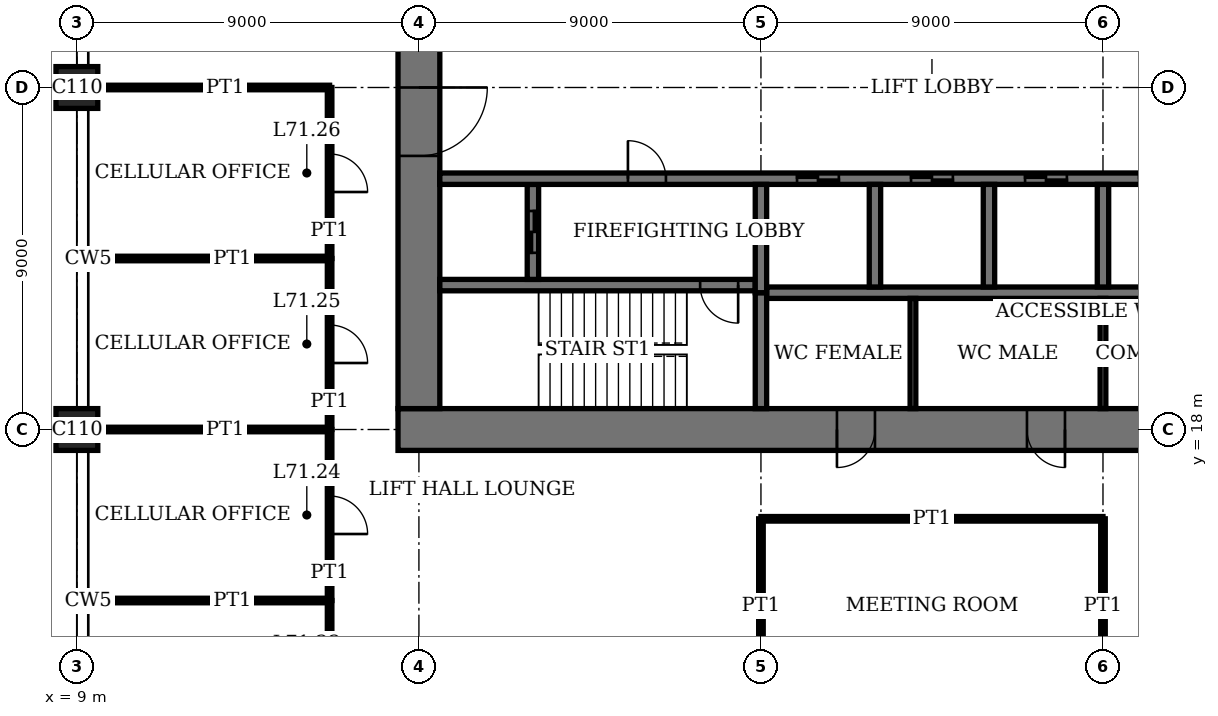
"""IFC4 building model, lengths in metres.
Left out: names, types, materials, properties, quantities, classifications, styles, units other than length and angle.
Written with IfcOpenShell. Run it as: python <this file> out.ifc"""

import sys

from ifc_helpers import new_model, si_unit, direction, frame, frame_2d, origin, origin_2d, place, context, subcontext, project, spatial, rectangle, extrude, element, fill, save


model = new_model("IFC4")
c1 = context("Model", 3, precision=1e-05, world=origin(), true_north=direction((0.0, 1.0)))
c2 = subcontext(c1, "Body", "Model", "MODEL_VIEW")
j1 = project(units=[si_unit("LENGTHUNIT", "METRE"), si_unit("PLANEANGLEUNIT", "RADIAN")], contexts=[c1])
p1 = place(None, origin())
s1 = spatial("IfcSite", under=j1, at=p1, CompositionType="ELEMENT")
p2 = place(p1, origin())
s2 = spatial("IfcBuilding", under=s1, at=p2, CompositionType="ELEMENT")
p3 = place(p2, frame((0.0, 0.0, 291.4)))
s3 = spatial("IfcBuildingStorey", under=s2, at=p3, CompositionType="ELEMENT", Elevation=291.4)
for number, where, z_axis, x_axis in (
    (1, (9.0, 18.0, 0.0), (0.0, 0.0, 1.0), (1.0, 0.0, 0.0)),
    (2, (9.0, 27.0, 0.0), (0.0, 0.0, 1.0), (1.0, 0.0, 0.0)),
):
    element("IfcColumn", number, at=place(p3, frame(where, z_axis=z_axis, x_axis=x_axis)), inside=s3, PredefinedType="COLUMN", context=c2, shape_type="SweptSolid", body=[
        extrude(rectangle(XDim=1.1, YDim=1.1, at=origin_2d()), origin(), (0.0, 0.0, 1.0), 4.0),
    ])
p4 = place(p3, frame((17.45, 18.0, 0.0), z_axis=(0.0, 0.0, 1.0), x_axis=(1.0, 0.0, 0.0)))
e3 = element("IfcWall", 3, at=p4, inside=s3, PredefinedType="SHEAR", context=c2, shape_type="SweptSolid", body=[
    extrude(rectangle(XDim=28.1, YDim=1.1, at=frame_2d((14.05, 0.0))), origin(), (0.0, 0.0, 1.0), 4.0),
])
p5 = place(p4, frame((11.55, 0.0, 0.0)))
e4 = element("IfcOpeningElement", 4, at=p5, cuts=e3, PredefinedType="OPENING", context=c2, shape_type="SweptSolid", body=[
    extrude(rectangle(XDim=1.0, YDim=2.4, at=frame_2d((0.5, 1.2))), frame((0.0, 0.56, 0.0), z_axis=(0.0, -1.0, 0.0), x_axis=(1.0, 0.0, 0.0)), (0.0, 0.0, 1.0), 1.12),
])
p6 = place(p4, frame((16.55, 0.0, 0.0)))
e5 = element("IfcOpeningElement", 5, at=p6, cuts=e3, PredefinedType="OPENING", context=c2, shape_type="SweptSolid", body=[
    extrude(rectangle(XDim=1.0, YDim=2.4, at=frame_2d((0.5, 1.2))), frame((0.0, 0.56, 0.0), z_axis=(0.0, -1.0, 0.0), x_axis=(1.0, 0.0, 0.0)), (0.0, 0.0, 1.0), 1.12),
])
p7 = place(p4, frame((20.0, 0.0, 0.0)))
e6 = element("IfcOpeningElement", 6, at=p7, cuts=e3, PredefinedType="OPENING", context=c2, shape_type="SweptSolid", body=[
    extrude(rectangle(XDim=1.1, YDim=2.4, at=frame_2d((0.55, 1.2))), frame((0.0, 0.56, 0.0), z_axis=(0.0, -1.0, 0.0), x_axis=(1.0, 0.0, 0.0)), (0.0, 0.0, 1.0), 1.12),
])
p8 = place(p4, frame((24.05, 0.0, 0.0)))
e7 = element("IfcOpeningElement", 7, at=p8, cuts=e3, PredefinedType="OPENING", context=c2, shape_type="SweptSolid", body=[
    extrude(rectangle(XDim=1.0, YDim=2.4, at=frame_2d((0.5, 1.2))), frame((0.0, 0.56, 0.0), z_axis=(0.0, -1.0, 0.0), x_axis=(1.0, 0.0, 0.0)), (0.0, 0.0, 1.0), 1.12),
])
p9 = place(p3, frame((18.0, 35.45, 0.0), z_axis=(0.0, 0.0, 1.0), x_axis=(0.0, -1.0, 0.0)))
e8 = element("IfcWall", 8, at=p9, inside=s3, PredefinedType="SHEAR", context=c2, shape_type="SweptSolid", body=[
    extrude(rectangle(XDim=16.9, YDim=1.1, at=frame_2d((8.45, 0.0))), origin(), (0.0, 0.0, 1.0), 4.0),
])
p10 = place(p9, frame((8.45, 0.0, 0.0)))
e9 = element("IfcOpeningElement", 9, at=p10, cuts=e8, PredefinedType="OPENING", context=c2, shape_type="SweptSolid", body=[
    extrude(rectangle(XDim=1.8, YDim=2.4, at=frame_2d((0.9, 1.2))), frame((0.0, 0.56, 0.0), z_axis=(0.0, -1.0, 0.0), x_axis=(1.0, 0.0, 0.0)), (0.0, 0.0, 1.0), 1.12),
])
p11 = place(p3, frame((18.55, 21.8, 0.0), z_axis=(0.0, 0.0, 1.0), x_axis=(1.0, 0.0, 0.0)))
e10 = element("IfcWall", 10, at=p11, inside=s3, PredefinedType="SHEAR", context=c2, shape_type="SweptSolid", body=[
    extrude(rectangle(XDim=8.3, YDim=0.3, at=frame_2d((4.15, 0.0))), origin(), (0.0, 0.0, 1.0), 4.0),
])
p12 = place(p11, frame((6.85, 0.0, 0.0)))
e11 = element("IfcOpeningElement", 11, at=p12, cuts=e10, PredefinedType="OPENING", context=c2, shape_type="SweptSolid", body=[
    extrude(rectangle(XDim=1.0, YDim=2.4, at=frame_2d((0.5, 1.2))), frame((0.0, 0.16, 0.0), z_axis=(0.0, -1.0, 0.0), x_axis=(1.0, 0.0, 0.0)), (0.0, 0.0, 1.0), 0.32),
])
p13 = place(p3, frame((27.0, 18.55, 0.0), z_axis=(0.0, 0.0, 1.0), x_axis=(0.0, 1.0, 0.0)))
e12 = element("IfcWall", 12, at=p13, inside=s3, PredefinedType="SHEAR", context=c2, shape_type="SweptSolid", body=[
    extrude(rectangle(XDim=3.05, YDim=0.3, at=frame_2d((1.525, 0.0))), origin(), (0.0, 0.0, 1.0), 4.0),
])
p14 = place(p3, frame((21.0, 21.95, 0.0), z_axis=(0.0, 0.0, 1.0), x_axis=(0.0, 1.0, 0.0)))
e13 = element("IfcWall", 13, at=p14, inside=s3, PredefinedType="SHEAR", context=c2, shape_type="SweptSolid", body=[
    extrude(rectangle(XDim=2.5, YDim=0.3, at=frame_2d((1.25, 0.0))), origin(), (0.0, 0.0, 1.0), 4.0),
])
p15 = place(p14, frame((0.7, 0.0, 0.0)))
e14 = element("IfcOpeningElement", 14, at=p15, cuts=e13, PredefinedType="OPENING", context=c2, shape_type="SweptSolid", body=[
    extrude(rectangle(XDim=1.1, YDim=2.4, at=frame_2d((0.55, 1.2))), frame((0.0, 0.16, 0.0), z_axis=(0.0, -1.0, 0.0), x_axis=(1.0, 0.0, 0.0)), (0.0, 0.0, 1.0), 0.32),
])
p16 = place(p3, frame((18.55, 24.6, 0.0), z_axis=(0.0, 0.0, 1.0), x_axis=(1.0, 0.0, 0.0)))
e15 = element("IfcWall", 15, at=p16, inside=s3, PredefinedType="SHEAR", context=c2, shape_type="SweptSolid", body=[
    extrude(rectangle(XDim=25.9, YDim=0.3, at=frame_2d((12.95, 0.0))), origin(), (0.0, 0.0, 1.0), 4.0),
])
p17 = place(p16, frame((4.95, 0.0, 0.0)))
e16 = element("IfcOpeningElement", 16, at=p17, cuts=e15, PredefinedType="OPENING", context=c2, shape_type="SweptSolid", body=[
    extrude(rectangle(XDim=1.0, YDim=2.4, at=frame_2d((0.5, 1.2))), frame((0.0, 0.16, 0.0), z_axis=(0.0, -1.0, 0.0), x_axis=(1.0, 0.0, 0.0)), (0.0, 0.0, 1.0), 0.32),
])
p18 = place(p16, frame((24.5, 0.0, 0.0)))
e17 = element("IfcOpeningElement", 17, at=p18, cuts=e15, PredefinedType="OPENING", context=c2, shape_type="SweptSolid", body=[
    extrude(rectangle(XDim=0.9, YDim=2.1, at=frame_2d((0.45, 1.05))), frame((0.0, 0.16, 0.0), z_axis=(0.0, -1.0, 0.0), x_axis=(1.0, 0.0, 0.0)), (0.0, 0.0, 1.0), 0.32),
])
p19 = place(p16, frame((9.4, 0.0, 0.0)))
e18 = element("IfcOpeningElement", 18, at=p19, cuts=e15, PredefinedType="OPENING", context=c2, shape_type="SweptSolid", body=[
    extrude(rectangle(XDim=1.1, YDim=2.4, at=frame_2d((0.55, 1.2))), frame((0.0, 0.16, 0.0), z_axis=(0.0, -1.0, 0.0), x_axis=(1.0, 0.0, 0.0)), (0.0, 0.0, 1.0), 0.32),
])
p20 = place(p16, frame((12.4, 0.0, 0.0)))
e19 = element("IfcOpeningElement", 19, at=p20, cuts=e15, PredefinedType="OPENING", context=c2, shape_type="SweptSolid", body=[
    extrude(rectangle(XDim=1.1, YDim=2.4, at=frame_2d((0.55, 1.2))), frame((0.0, 0.16, 0.0), z_axis=(0.0, -1.0, 0.0), x_axis=(1.0, 0.0, 0.0)), (0.0, 0.0, 1.0), 0.32),
])
p21 = place(p16, frame((15.4, 0.0, 0.0)))
e20 = element("IfcOpeningElement", 20, at=p21, cuts=e15, PredefinedType="OPENING", context=c2, shape_type="SweptSolid", body=[
    extrude(rectangle(XDim=1.1, YDim=2.4, at=frame_2d((0.55, 1.2))), frame((0.0, 0.16, 0.0), z_axis=(0.0, -1.0, 0.0), x_axis=(1.0, 0.0, 0.0)), (0.0, 0.0, 1.0), 0.32),
])
p22 = place(p16, frame((18.4, 0.0, 0.0)))
e21 = element("IfcOpeningElement", 21, at=p22, cuts=e15, PredefinedType="OPENING", context=c2, shape_type="SweptSolid", body=[
    extrude(rectangle(XDim=1.1, YDim=2.4, at=frame_2d((0.55, 1.2))), frame((0.0, 0.16, 0.0), z_axis=(0.0, -1.0, 0.0), x_axis=(1.0, 0.0, 0.0)), (0.0, 0.0, 1.0), 0.32),
])
p23 = place(p16, frame((21.3, 0.0, 0.0)))
e22 = element("IfcOpeningElement", 22, at=p23, cuts=e15, PredefinedType="OPENING", context=c2, shape_type="SweptSolid", body=[
    extrude(rectangle(XDim=1.3, YDim=2.4, at=frame_2d((0.65, 1.2))), frame((0.0, 0.16, 0.0), z_axis=(0.0, -1.0, 0.0), x_axis=(1.0, 0.0, 0.0)), (0.0, 0.0, 1.0), 0.32),
])
p24 = place(p3, frame((27.15, 21.6, 0.0), z_axis=(0.0, 0.0, 1.0), x_axis=(1.0, 0.0, 0.0)))
e23 = element("IfcWall", 23, at=p24, inside=s3, PredefinedType="SHEAR", context=c2, shape_type="SweptSolid", body=[
    extrude(rectangle(XDim=17.3, YDim=0.3, at=frame_2d((8.65, 0.0))), origin(), (0.0, 0.0, 1.0), 4.0),
])
for number, where, z_axis, x_axis in (
    (24, (30.0, 21.75, 0.0), (0.0, 0.0, 1.0), (0.0, 1.0, 0.0)),
    (25, (33.0, 21.75, 0.0), (0.0, 0.0, 1.0), (0.0, 1.0, 0.0)),
    (26, (36.0, 21.75, 0.0), (0.0, 0.0, 1.0), (0.0, 1.0, 0.0)),
):
    element("IfcWall", number, at=place(p3, frame(where, z_axis=z_axis, x_axis=x_axis)), inside=s3, PredefinedType="SHEAR", context=c2, shape_type="SweptSolid", body=[
        extrude(rectangle(XDim=2.7, YDim=0.3, at=frame_2d((1.35, 0.0))), origin(), (0.0, 0.0, 1.0), 4.0),
    ])
p25 = place(p3, frame((27.0, 21.6, 0.0), z_axis=(0.0, 0.0, 1.0), x_axis=(0.0, 1.0, 0.0)))
e27 = element("IfcWall", 27, at=p25, inside=s3, PredefinedType="SHEAR", context=c2, shape_type="SweptSolid", body=[
    extrude(rectangle(XDim=2.85, YDim=0.3, at=frame_2d((1.425, 0.0))), origin(), (0.0, 0.0, 1.0), 4.0),
])
p26 = place(p3, frame((9.31, 13.5, 0.0), z_axis=(0.0, 0.0, 1.0), x_axis=(1.0, 0.0, 0.0)))
e28 = element("IfcWall", 28, at=p26, inside=s3, PredefinedType="PARTITIONING", context=c2, shape_type="SweptSolid", body=[
    extrude(rectangle(XDim=6.34, YDim=0.12, at=frame_2d((3.17, 0.0))), origin(), (0.0, 0.0, 1.0), 3.1),
])
p27 = place(p3, frame((27.0, 15.65, 0.0), z_axis=(0.0, 0.0, 1.0), x_axis=(1.0, 0.0, 0.0)))
e29 = element("IfcWall", 29, at=p27, inside=s3, PredefinedType="PARTITIONING", context=c2, shape_type="SweptSolid", body=[
    extrude(rectangle(XDim=9.0, YDim=0.12, at=frame_2d((4.5, 0.0))), origin(), (0.0, 0.0, 1.0), 3.75),
])
p28 = place(p3, frame((9.55, 18.0, 0.0), z_axis=(0.0, 0.0, 1.0), x_axis=(1.0, 0.0, 0.0)))
e30 = element("IfcWall", 30, at=p28, inside=s3, PredefinedType="PARTITIONING", context=c2, shape_type="SweptSolid", body=[
    extrude(rectangle(XDim=6.1, YDim=0.12, at=frame_2d((3.05, 0.0))), origin(), (0.0, 0.0, 1.0), 3.05),
])
p29 = place(p3, frame((9.31, 22.5, 0.0), z_axis=(0.0, 0.0, 1.0), x_axis=(1.0, 0.0, 0.0)))
e31 = element("IfcWall", 31, at=p29, inside=s3, PredefinedType="PARTITIONING", context=c2, shape_type="SweptSolid", body=[
    extrude(rectangle(XDim=6.34, YDim=0.12, at=frame_2d((3.17, 0.0))), origin(), (0.0, 0.0, 1.0), 3.1),
])
p30 = place(p3, frame((9.55, 27.0, 0.0), z_axis=(0.0, 0.0, 1.0), x_axis=(1.0, 0.0, 0.0)))
e32 = element("IfcWall", 32, at=p30, inside=s3, PredefinedType="PARTITIONING", context=c2, shape_type="SweptSolid", body=[
    extrude(rectangle(XDim=6.1, YDim=0.12, at=frame_2d((3.05, 0.0))), origin(), (0.0, 0.0, 1.0), 3.05),
])
p31 = place(p3, frame((15.65, 9.0, 0.0), z_axis=(0.0, 0.0, 1.0), x_axis=(0.0, 1.0, 0.0)))
e33 = element("IfcWall", 33, at=p31, inside=s3, PredefinedType="PARTITIONING", context=c2, shape_type="SweptSolid", body=[
    extrude(rectangle(XDim=4.5, YDim=0.12, at=frame_2d((2.25, 0.0))), origin(), (0.0, 0.0, 1.0), 3.75),
])
p32 = place(p31, frame((1.75, 0.0, 0.0)))
e34 = element("IfcOpeningElement", 34, at=p32, cuts=e33, PredefinedType="OPENING", context=c2, shape_type="SweptSolid", body=[
    extrude(rectangle(XDim=1.0, YDim=2.4, at=frame_2d((0.5, 1.2))), frame((0.0, 0.07, 0.0), z_axis=(0.0, -1.0, 0.0), x_axis=(1.0, 0.0, 0.0)), (0.0, 0.0, 1.0), 0.14),
])
p33 = place(p3, frame((15.65, 13.5, 0.0), z_axis=(0.0, 0.0, 1.0), x_axis=(0.0, 1.0, 0.0)))
e35 = element("IfcWall", 35, at=p33, inside=s3, PredefinedType="PARTITIONING", context=c2, shape_type="SweptSolid", body=[
    extrude(rectangle(XDim=4.5, YDim=0.12, at=frame_2d((2.25, 0.0))), origin(), (0.0, 0.0, 1.0), 3.75),
])
p34 = place(p33, frame((1.75, 0.0, 0.0)))
e36 = element("IfcOpeningElement", 36, at=p34, cuts=e35, PredefinedType="OPENING", context=c2, shape_type="SweptSolid", body=[
    extrude(rectangle(XDim=1.0, YDim=2.4, at=frame_2d((0.5, 1.2))), frame((0.0, 0.07, 0.0), z_axis=(0.0, -1.0, 0.0), x_axis=(1.0, 0.0, 0.0)), (0.0, 0.0, 1.0), 0.14),
])
p35 = place(p3, frame((15.65, 18.0, 0.0), z_axis=(0.0, 0.0, 1.0), x_axis=(0.0, 1.0, 0.0)))
e37 = element("IfcWall", 37, at=p35, inside=s3, PredefinedType="PARTITIONING", context=c2, shape_type="SweptSolid", body=[
    extrude(rectangle(XDim=4.5, YDim=0.12, at=frame_2d((2.25, 0.0))), origin(), (0.0, 0.0, 1.0), 3.75),
])
p36 = place(p35, frame((1.75, 0.0, 0.0)))
e38 = element("IfcOpeningElement", 38, at=p36, cuts=e37, PredefinedType="OPENING", context=c2, shape_type="SweptSolid", body=[
    extrude(rectangle(XDim=1.0, YDim=2.4, at=frame_2d((0.5, 1.2))), frame((0.0, 0.07, 0.0), z_axis=(0.0, -1.0, 0.0), x_axis=(1.0, 0.0, 0.0)), (0.0, 0.0, 1.0), 0.14),
])
p37 = place(p3, frame((15.65, 22.5, 0.0), z_axis=(0.0, 0.0, 1.0), x_axis=(0.0, 1.0, 0.0)))
e39 = element("IfcWall", 39, at=p37, inside=s3, PredefinedType="PARTITIONING", context=c2, shape_type="SweptSolid", body=[
    extrude(rectangle(XDim=4.5, YDim=0.12, at=frame_2d((2.25, 0.0))), origin(), (0.0, 0.0, 1.0), 3.75),
])
p38 = place(p37, frame((1.75, 0.0, 0.0)))
e40 = element("IfcOpeningElement", 40, at=p38, cuts=e39, PredefinedType="OPENING", context=c2, shape_type="SweptSolid", body=[
    extrude(rectangle(XDim=1.0, YDim=2.4, at=frame_2d((0.5, 1.2))), frame((0.0, 0.07, 0.0), z_axis=(0.0, -1.0, 0.0), x_axis=(1.0, 0.0, 0.0)), (0.0, 0.0, 1.0), 0.14),
])
for number, where, z_axis, x_axis in (
    (41, (27.0, 11.05, 0.0), (0.0, 0.0, 1.0), (0.0, 1.0, 0.0)),
    (42, (36.0, 11.05, 0.0), (0.0, 0.0, 1.0), (0.0, 1.0, 0.0)),
):
    element("IfcWall", number, at=place(p3, frame(where, z_axis=z_axis, x_axis=x_axis)), inside=s3, PredefinedType="PARTITIONING", context=c2, shape_type="SweptSolid", body=[
        extrude(rectangle(XDim=4.6, YDim=0.12, at=frame_2d((2.3, 0.0))), origin(), (0.0, 0.0, 1.0), 3.05),
    ])
for number, where, z_axis, x_axis in (
    (43, (31.0, 18.55, 0.0), (0.0, 0.0, 1.0), (0.0, 1.0, 0.0)),
    (44, (36.0, 18.55, 0.0), (0.0, 0.0, 1.0), (0.0, 1.0, 0.0)),
):
    element("IfcWall", number, at=place(p3, frame(where, z_axis=z_axis, x_axis=x_axis)), inside=s3, PredefinedType="PARTITIONING", context=c2, shape_type="SweptSolid", body=[
        extrude(rectangle(XDim=2.9, YDim=0.15, at=frame_2d((1.45, 0.0))), origin(), (0.0, 0.0, 1.0), 3.75),
    ])
p39 = place(p10, origin())
e45 = element("IfcDoor", 45, at=p39, inside=s3, OperationType="DOUBLE_DOOR_DOUBLE_SWING", PredefinedType="DOOR", context=c2, shape_type="SweptSolid", body=[
    extrude(rectangle(XDim=1.8, YDim=2.4, at=frame_2d((0.9, 1.2))), frame((0.0, 0.03, 0.0), z_axis=(0.0, -1.0, 0.0), x_axis=(1.0, 0.0, 0.0)), (0.0, 0.0, 1.0), 0.06),
    extrude(rectangle(XDim=0.04, YDim=2.4, at=frame_2d((0.02, 1.2))), frame((0.0, 0.55, 0.0), z_axis=(0.0, -1.0, 0.0), x_axis=(1.0, 0.0, 0.0)), (0.0, 0.0, 1.0), 1.1),
    extrude(rectangle(XDim=0.04, YDim=2.4, at=frame_2d((1.78, 1.2))), frame((0.0, 0.55, 0.0), z_axis=(0.0, -1.0, 0.0), x_axis=(1.0, 0.0, 0.0)), (0.0, 0.0, 1.0), 1.1),
    extrude(rectangle(XDim=1.8, YDim=0.04, at=frame_2d((0.9, 2.38))), frame((0.0, 0.55, 0.0), z_axis=(0.0, -1.0, 0.0), x_axis=(1.0, 0.0, 0.0)), (0.0, 0.0, 1.0), 1.1),
])
fill(e9, e45)
p40 = place(p5, origin())
e46 = element("IfcDoor", 46, at=p40, inside=s3, OperationType="SINGLE_SWING_LEFT", PredefinedType="DOOR", context=c2, shape_type="SweptSolid", body=[
    extrude(rectangle(XDim=1.0, YDim=2.4, at=frame_2d((0.5, 1.2))), frame((0.0, 0.025, 0.0), z_axis=(0.0, -1.0, 0.0), x_axis=(1.0, 0.0, 0.0)), (0.0, 0.0, 1.0), 0.05),
    extrude(rectangle(XDim=0.04, YDim=2.4, at=frame_2d((0.02, 1.2))), frame((0.0, 0.4, 0.0), z_axis=(0.0, -1.0, 0.0), x_axis=(1.0, 0.0, 0.0)), (0.0, 0.0, 1.0), 0.8),
    extrude(rectangle(XDim=0.04, YDim=2.4, at=frame_2d((0.98, 1.2))), frame((0.0, 0.4, 0.0), z_axis=(0.0, -1.0, 0.0), x_axis=(1.0, 0.0, 0.0)), (0.0, 0.0, 1.0), 0.8),
    extrude(rectangle(XDim=1.0, YDim=0.04, at=frame_2d((0.5, 2.38))), frame((0.0, 0.4, 0.0), z_axis=(0.0, -1.0, 0.0), x_axis=(1.0, 0.0, 0.0)), (0.0, 0.0, 1.0), 0.8),
])
fill(e4, e46)
p41 = place(p6, origin())
e47 = element("IfcDoor", 47, at=p41, inside=s3, OperationType="SINGLE_SWING_RIGHT", PredefinedType="DOOR", context=c2, shape_type="SweptSolid", body=[
    extrude(rectangle(XDim=1.0, YDim=2.4, at=frame_2d((0.5, 1.2))), frame((0.0, 0.025, 0.0), z_axis=(0.0, -1.0, 0.0), x_axis=(1.0, 0.0, 0.0)), (0.0, 0.0, 1.0), 0.05),
    extrude(rectangle(XDim=0.04, YDim=2.4, at=frame_2d((0.02, 1.2))), frame((0.0, 0.4, 0.0), z_axis=(0.0, -1.0, 0.0), x_axis=(1.0, 0.0, 0.0)), (0.0, 0.0, 1.0), 0.8),
    extrude(rectangle(XDim=0.04, YDim=2.4, at=frame_2d((0.98, 1.2))), frame((0.0, 0.4, 0.0), z_axis=(0.0, -1.0, 0.0), x_axis=(1.0, 0.0, 0.0)), (0.0, 0.0, 1.0), 0.8),
    extrude(rectangle(XDim=1.0, YDim=0.04, at=frame_2d((0.5, 2.38))), frame((0.0, 0.4, 0.0), z_axis=(0.0, -1.0, 0.0), x_axis=(1.0, 0.0, 0.0)), (0.0, 0.0, 1.0), 0.8),
])
fill(e5, e47)
p42 = place(p12, origin())
e48 = element("IfcDoor", 48, at=p42, inside=s3, OperationType="SINGLE_SWING_RIGHT", PredefinedType="DOOR", context=c2, shape_type="SweptSolid", body=[
    extrude(rectangle(XDim=1.0, YDim=2.4, at=frame_2d((0.5, 1.2))), frame((0.0, 0.03, 0.0), z_axis=(0.0, -1.0, 0.0), x_axis=(1.0, 0.0, 0.0)), (0.0, 0.0, 1.0), 0.06),
])
fill(e11, e48)
p43 = place(p17, origin())
e49 = element("IfcDoor", 49, at=p43, inside=s3, OperationType="SINGLE_SWING_RIGHT", PredefinedType="DOOR", context=c2, shape_type="SweptSolid", body=[
    extrude(rectangle(XDim=1.0, YDim=2.4, at=frame_2d((0.5, 1.2))), frame((0.0, 0.03, 0.0), z_axis=(0.0, -1.0, 0.0), x_axis=(1.0, 0.0, 0.0)), (0.0, 0.0, 1.0), 0.06),
])
fill(e16, e49)
p44 = place(p34, origin())
e50 = element("IfcDoor", 50, at=p44, inside=s3, OperationType="SINGLE_SWING_LEFT", PredefinedType="DOOR", context=c2, shape_type="SweptSolid", body=[
    extrude(rectangle(XDim=1.0, YDim=2.4, at=frame_2d((0.5, 1.2))), frame((0.0, 0.025, 0.0), z_axis=(0.0, -1.0, 0.0), x_axis=(1.0, 0.0, 0.0)), (0.0, 0.0, 1.0), 0.05),
])
fill(e36, e50)
p45 = place(p36, origin())
e51 = element("IfcDoor", 51, at=p45, inside=s3, OperationType="SINGLE_SWING_LEFT", PredefinedType="DOOR", context=c2, shape_type="SweptSolid", body=[
    extrude(rectangle(XDim=1.0, YDim=2.4, at=frame_2d((0.5, 1.2))), frame((0.0, 0.025, 0.0), z_axis=(0.0, -1.0, 0.0), x_axis=(1.0, 0.0, 0.0)), (0.0, 0.0, 1.0), 0.05),
])
fill(e38, e51)
p46 = place(p38, origin())
e52 = element("IfcDoor", 52, at=p46, inside=s3, OperationType="SINGLE_SWING_LEFT", PredefinedType="DOOR", context=c2, shape_type="SweptSolid", body=[
    extrude(rectangle(XDim=1.0, YDim=2.4, at=frame_2d((0.5, 1.2))), frame((0.0, 0.025, 0.0), z_axis=(0.0, -1.0, 0.0), x_axis=(1.0, 0.0, 0.0)), (0.0, 0.0, 1.0), 0.05),
])
fill(e40, e52)
p47 = place(p19, origin())
e53 = element("IfcDoor", 53, at=p47, inside=s3, OperationType="DOUBLE_DOOR_SLIDING", PredefinedType="DOOR", context=c2, shape_type="SweptSolid", body=[
    extrude(rectangle(XDim=1.1, YDim=2.4, at=frame_2d((0.55, 1.2))), frame((0.0, 0.02, 0.0), z_axis=(0.0, -1.0, 0.0), x_axis=(1.0, 0.0, 0.0)), (0.0, 0.0, 1.0), 0.04),
])
fill(e18, e53)
p48 = place(p20, origin())
e54 = element("IfcDoor", 54, at=p48, inside=s3, OperationType="DOUBLE_DOOR_SLIDING", PredefinedType="DOOR", context=c2, shape_type="SweptSolid", body=[
    extrude(rectangle(XDim=1.1, YDim=2.4, at=frame_2d((0.55, 1.2))), frame((0.0, 0.02, 0.0), z_axis=(0.0, -1.0, 0.0), x_axis=(1.0, 0.0, 0.0)), (0.0, 0.0, 1.0), 0.04),
])
fill(e19, e54)
p49 = place(p21, origin())
e55 = element("IfcDoor", 55, at=p49, inside=s3, OperationType="DOUBLE_DOOR_SLIDING", PredefinedType="DOOR", context=c2, shape_type="SweptSolid", body=[
    extrude(rectangle(XDim=1.1, YDim=2.4, at=frame_2d((0.55, 1.2))), frame((0.0, 0.02, 0.0), z_axis=(0.0, -1.0, 0.0), x_axis=(1.0, 0.0, 0.0)), (0.0, 0.0, 1.0), 0.04),
])
fill(e20, e55)
p50 = place(p15, origin())
e56 = element("IfcDoor", 56, at=p50, inside=s3, OperationType="DOUBLE_DOOR_SLIDING", PredefinedType="DOOR", context=c2, shape_type="SweptSolid", body=[
    extrude(rectangle(XDim=1.1, YDim=2.4, at=frame_2d((0.55, 1.2))), frame((0.0, 0.03, 0.0), z_axis=(0.0, -1.0, 0.0), x_axis=(1.0, 0.0, 0.0)), (0.0, 0.0, 1.0), 0.06),
])
fill(e14, e56)
save(model, sys.argv[1])
